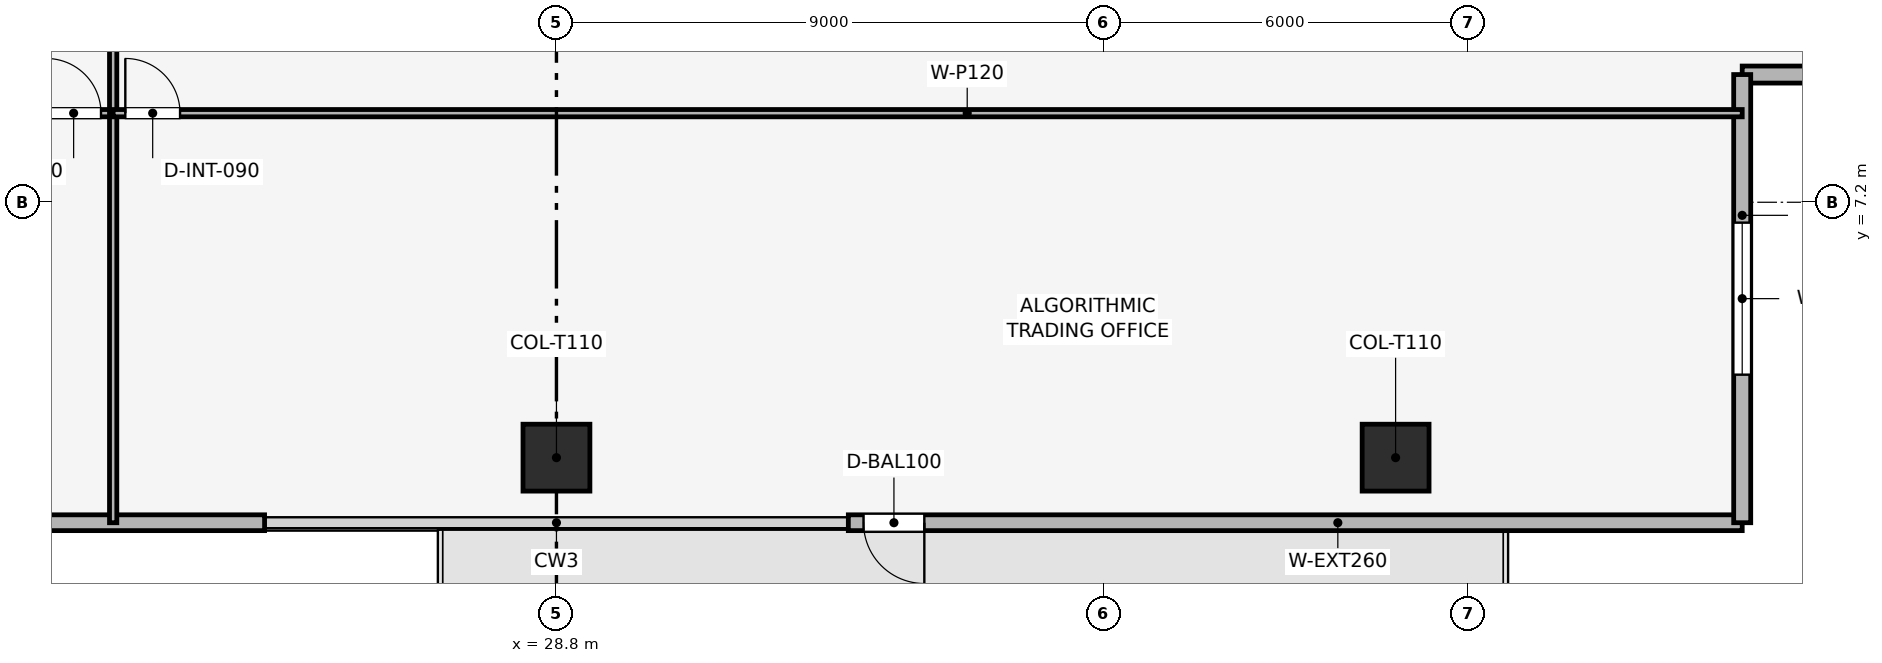
"""IFC4 building model, lengths in metres.
Left out: names, types, materials, properties, quantities, classifications, styles, units other than length and angle.
Written with IfcOpenShell. Run it as: python <this file> out.ifc"""

import sys

from ifc_helpers import new_model, si_unit, direction, frame, frame_2d, origin, origin_2d, place, context, subcontext, project, spatial, rectangle, extrude, element, fill, save


model = new_model("IFC4")
c1 = context("Model", 3, precision=1e-05, world=origin(), true_north=direction((0.0, 1.0)))
c2 = subcontext(c1, "Body", "Model", "MODEL_VIEW")
j1 = project(units=[si_unit("LENGTHUNIT", "METRE"), si_unit("PLANEANGLEUNIT", "RADIAN")], contexts=[c1])
p1 = place(None, origin())
s1 = spatial("IfcSite", under=j1, at=p1, CompositionType="ELEMENT")
p2 = place(p1, origin())
s2 = spatial("IfcBuilding", under=s1, at=p2, CompositionType="ELEMENT")
p3 = place(p2, frame((0.0, 0.0, 214.95)))
s3 = spatial("IfcBuildingStorey", under=s2, at=p3, CompositionType="ELEMENT", Elevation=214.95)
for number, where, z_axis, x_axis in (
    (1, (28.8, 3.0, 0.003), (0.0, 0.0, 1.0), (1.0, 0.0, 0.0)),
    (2, (42.6, 3.0, 0.003), (0.0, 0.0, 1.0), (1.0, 0.0, 0.0)),
):
    element("IfcColumn", number, at=place(p3, frame(where, z_axis=z_axis, x_axis=x_axis)), inside=s3, PredefinedType="COLUMN", context=c2, shape_type="SweptSolid", body=[
        extrude(rectangle(XDim=1.1, YDim=1.1, at=origin_2d()), origin(), (0.0, 0.0, 1.0), 3.494),
    ])
p4 = place(p3, frame((48.3, 1.93, 0.0), z_axis=(0.0, 0.0, 1.0), x_axis=(-1.0, 0.0, 0.0)))
e3 = element("IfcWall", 3, at=p4, inside=s3, PredefinedType="SOLIDWALL", context=c2, shape_type="SweptSolid", body=[
    extrude(rectangle(XDim=14.7, YDim=0.26, at=frame_2d((7.35, 0.0))), origin(), (0.0, 0.0, 1.0), 3.5),
])
p5 = place(p4, frame((13.45, 0.0, 0.0)))
e4 = element("IfcOpeningElement", 4, at=p5, cuts=e3, PredefinedType="OPENING", context=c2, shape_type="SweptSolid", body=[
    extrude(rectangle(XDim=1.0, YDim=2.2, at=frame_2d((0.5, 1.1))), frame((0.0, 0.14, 0.0), z_axis=(0.0, -1.0, 0.0), x_axis=(1.0, 0.0, 0.0)), (0.0, 0.0, 1.0), 0.28),
])
p6 = place(p3, frame((24.0, 1.93, 0.0), z_axis=(0.0, 0.0, 1.0), x_axis=(-1.0, 0.0, 0.0)))
e5 = element("IfcWall", 5, at=p6, inside=s3, PredefinedType="SOLIDWALL", context=c2, shape_type="SweptSolid", body=[
    extrude(rectangle(XDim=14.7, YDim=0.26, at=frame_2d((7.35, 0.0))), origin(), (0.0, 0.0, 1.0), 3.5),
])
p7 = place(p6, frame((10.65, 0.0, 0.9)))
e6 = element("IfcOpeningElement", 6, at=p7, cuts=e5, PredefinedType="OPENING", context=c2, shape_type="SweptSolid", body=[
    extrude(rectangle(XDim=3.8, YDim=1.9, at=frame_2d((1.9, 0.95))), frame((0.0, 0.14, 0.0), z_axis=(0.0, -1.0, 0.0), x_axis=(1.0, 0.0, 0.0)), (0.0, 0.0, 1.0), 0.28),
])
p8 = place(p3, frame((55.67, 9.3, 0.0), z_axis=(0.0, 0.0, 1.0), x_axis=(-1.0, 0.0, 0.0)))
e7 = element("IfcWall", 7, at=p8, inside=s3, PredefinedType="SOLIDWALL", context=c2, shape_type="SweptSolid", body=[
    extrude(rectangle(XDim=7.37, YDim=0.28, at=frame_2d((3.685, 0.0))), origin(), (0.0, 0.0, 1.0), 3.5),
])
p9 = place(p8, frame((2.435, 0.0, 0.9)))
e8 = element("IfcOpeningElement", 8, at=p9, cuts=e7, PredefinedType="OPENING", context=c2, shape_type="SweptSolid", body=[
    extrude(rectangle(XDim=2.5, YDim=1.9, at=frame_2d((1.25, 0.95))), frame((0.0, 0.15, 0.0), z_axis=(0.0, -1.0, 0.0), x_axis=(1.0, 0.0, 0.0)), (0.0, 0.0, 1.0), 0.3),
])
p10 = place(p3, frame((48.3, 9.3, 0.0), z_axis=(0.0, 0.0, 1.0), x_axis=(0.0, -1.0, 0.0)))
e9 = element("IfcWall", 9, at=p10, inside=s3, PredefinedType="SOLIDWALL", context=c2, shape_type="SweptSolid", body=[
    extrude(rectangle(XDim=7.37, YDim=0.28, at=frame_2d((3.685, 0.0))), origin(), (0.0, 0.0, 1.0), 3.5),
])
p11 = place(p10, frame((2.435, 0.0, 0.9)))
e10 = element("IfcOpeningElement", 10, at=p11, cuts=e9, PredefinedType="OPENING", context=c2, shape_type="SweptSolid", body=[
    extrude(rectangle(XDim=2.5, YDim=1.9, at=frame_2d((1.25, 0.95))), frame((0.0, 0.15, 0.0), z_axis=(0.0, -1.0, 0.0), x_axis=(1.0, 0.0, 0.0)), (0.0, 0.0, 1.0), 0.3),
])
p12 = place(p3, frame((9.3, 8.665, 0.0), z_axis=(0.0, 0.0, 1.0), x_axis=(1.0, 0.0, 0.0)))
e11 = element("IfcWall", 11, at=p12, inside=s3, PredefinedType="PARTITIONING", context=c2, shape_type="SweptSolid", body=[
    extrude(rectangle(XDim=12.21, YDim=0.12, at=frame_2d((6.105, 0.0))), origin(), (0.0, 0.0, 1.0), 2.885),
])
p13 = place(p12, frame((11.11, 0.0, 0.0)))
e12 = element("IfcOpeningElement", 12, at=p13, cuts=e11, PredefinedType="OPENING", context=c2, shape_type="SweptSolid", body=[
    extrude(rectangle(XDim=0.9, YDim=2.1, at=frame_2d((0.45, 1.05))), frame((0.0, 0.07, 0.0), z_axis=(0.0, -1.0, 0.0), x_axis=(1.0, 0.0, 0.0)), (0.0, 0.0, 1.0), 0.14),
])
p14 = place(p3, frame((21.51, 1.93, 0.0), z_axis=(0.0, 0.0, 1.0), x_axis=(0.0, 1.0, 0.0)))
e13 = element("IfcWall", 13, at=p14, inside=s3, PredefinedType="PARTITIONING", context=c2, shape_type="SweptSolid", body=[
    extrude(rectangle(XDim=15.47, YDim=0.12, at=frame_2d((7.735, 0.0))), origin(), (0.0, 0.0, 1.0), 2.885),
])
p15 = place(p3, frame((21.51, 8.665, 0.0), z_axis=(0.0, 0.0, 1.0), x_axis=(1.0, 0.0, 0.0)))
e14 = element("IfcWall", 14, at=p15, inside=s3, PredefinedType="PARTITIONING", context=c2, shape_type="SweptSolid", body=[
    extrude(rectangle(XDim=26.79, YDim=0.12, at=frame_2d((13.395, 0.0))), origin(), (0.0, 0.0, 1.0), 2.885),
])
p16 = place(p15, frame((0.2, 0.0, 0.0)))
e15 = element("IfcOpeningElement", 15, at=p16, cuts=e14, PredefinedType="OPENING", context=c2, shape_type="SweptSolid", body=[
    extrude(rectangle(XDim=0.9, YDim=2.1, at=frame_2d((0.45, 1.05))), frame((0.0, 0.07, 0.0), z_axis=(0.0, -1.0, 0.0), x_axis=(1.0, 0.0, 0.0)), (0.0, 0.0, 1.0), 0.14),
])
p17 = place(p5, origin())
e16 = element("IfcDoor", 16, at=p17, inside=s3, OperationType="SINGLE_SWING_LEFT", PredefinedType="DOOR", context=c2, shape_type="SweptSolid", body=[
    extrude(rectangle(XDim=1.0, YDim=2.2, at=frame_2d((0.5, 1.1))), frame((0.0, 0.025, 0.0), z_axis=(0.0, -1.0, 0.0), x_axis=(1.0, 0.0, 0.0)), (0.0, 0.0, 1.0), 0.05),
])
fill(e4, e16)
p18 = place(p11, origin())
e17 = element("IfcWindow", 17, at=p18, inside=s3, PartitioningType="SINGLE_PANEL", PredefinedType="WINDOW", context=c2, shape_type="SweptSolid", body=[
    extrude(rectangle(XDim=2.5, YDim=1.9, at=frame_2d((1.25, 0.95))), frame((0.0, 0.03, 0.0), z_axis=(0.0, -1.0, 0.0), x_axis=(1.0, 0.0, 0.0)), (0.0, 0.0, 1.0), 0.06),
])
fill(e10, e17)
p19 = place(p13, origin())
e18 = element("IfcDoor", 18, at=p19, inside=s3, OperationType="SINGLE_SWING_LEFT", PredefinedType="DOOR", context=c2, shape_type="SweptSolid", body=[
    extrude(rectangle(XDim=0.9, YDim=2.1, at=frame_2d((0.45, 1.05))), frame((0.0, 0.025, 0.0), z_axis=(0.0, -1.0, 0.0), x_axis=(1.0, 0.0, 0.0)), (0.0, 0.0, 1.0), 0.05),
])
fill(e12, e18)
p20 = place(p16, origin())
e19 = element("IfcDoor", 19, at=p20, inside=s3, OperationType="SINGLE_SWING_LEFT", PredefinedType="DOOR", context=c2, shape_type="SweptSolid", body=[
    extrude(rectangle(XDim=0.9, YDim=2.1, at=frame_2d((0.45, 1.05))), frame((0.0, 0.025, 0.0), z_axis=(0.0, -1.0, 0.0), x_axis=(1.0, 0.0, 0.0)), (0.0, 0.0, 1.0), 0.05),
])
fill(e15, e19)
save(model, sys.argv[1])
